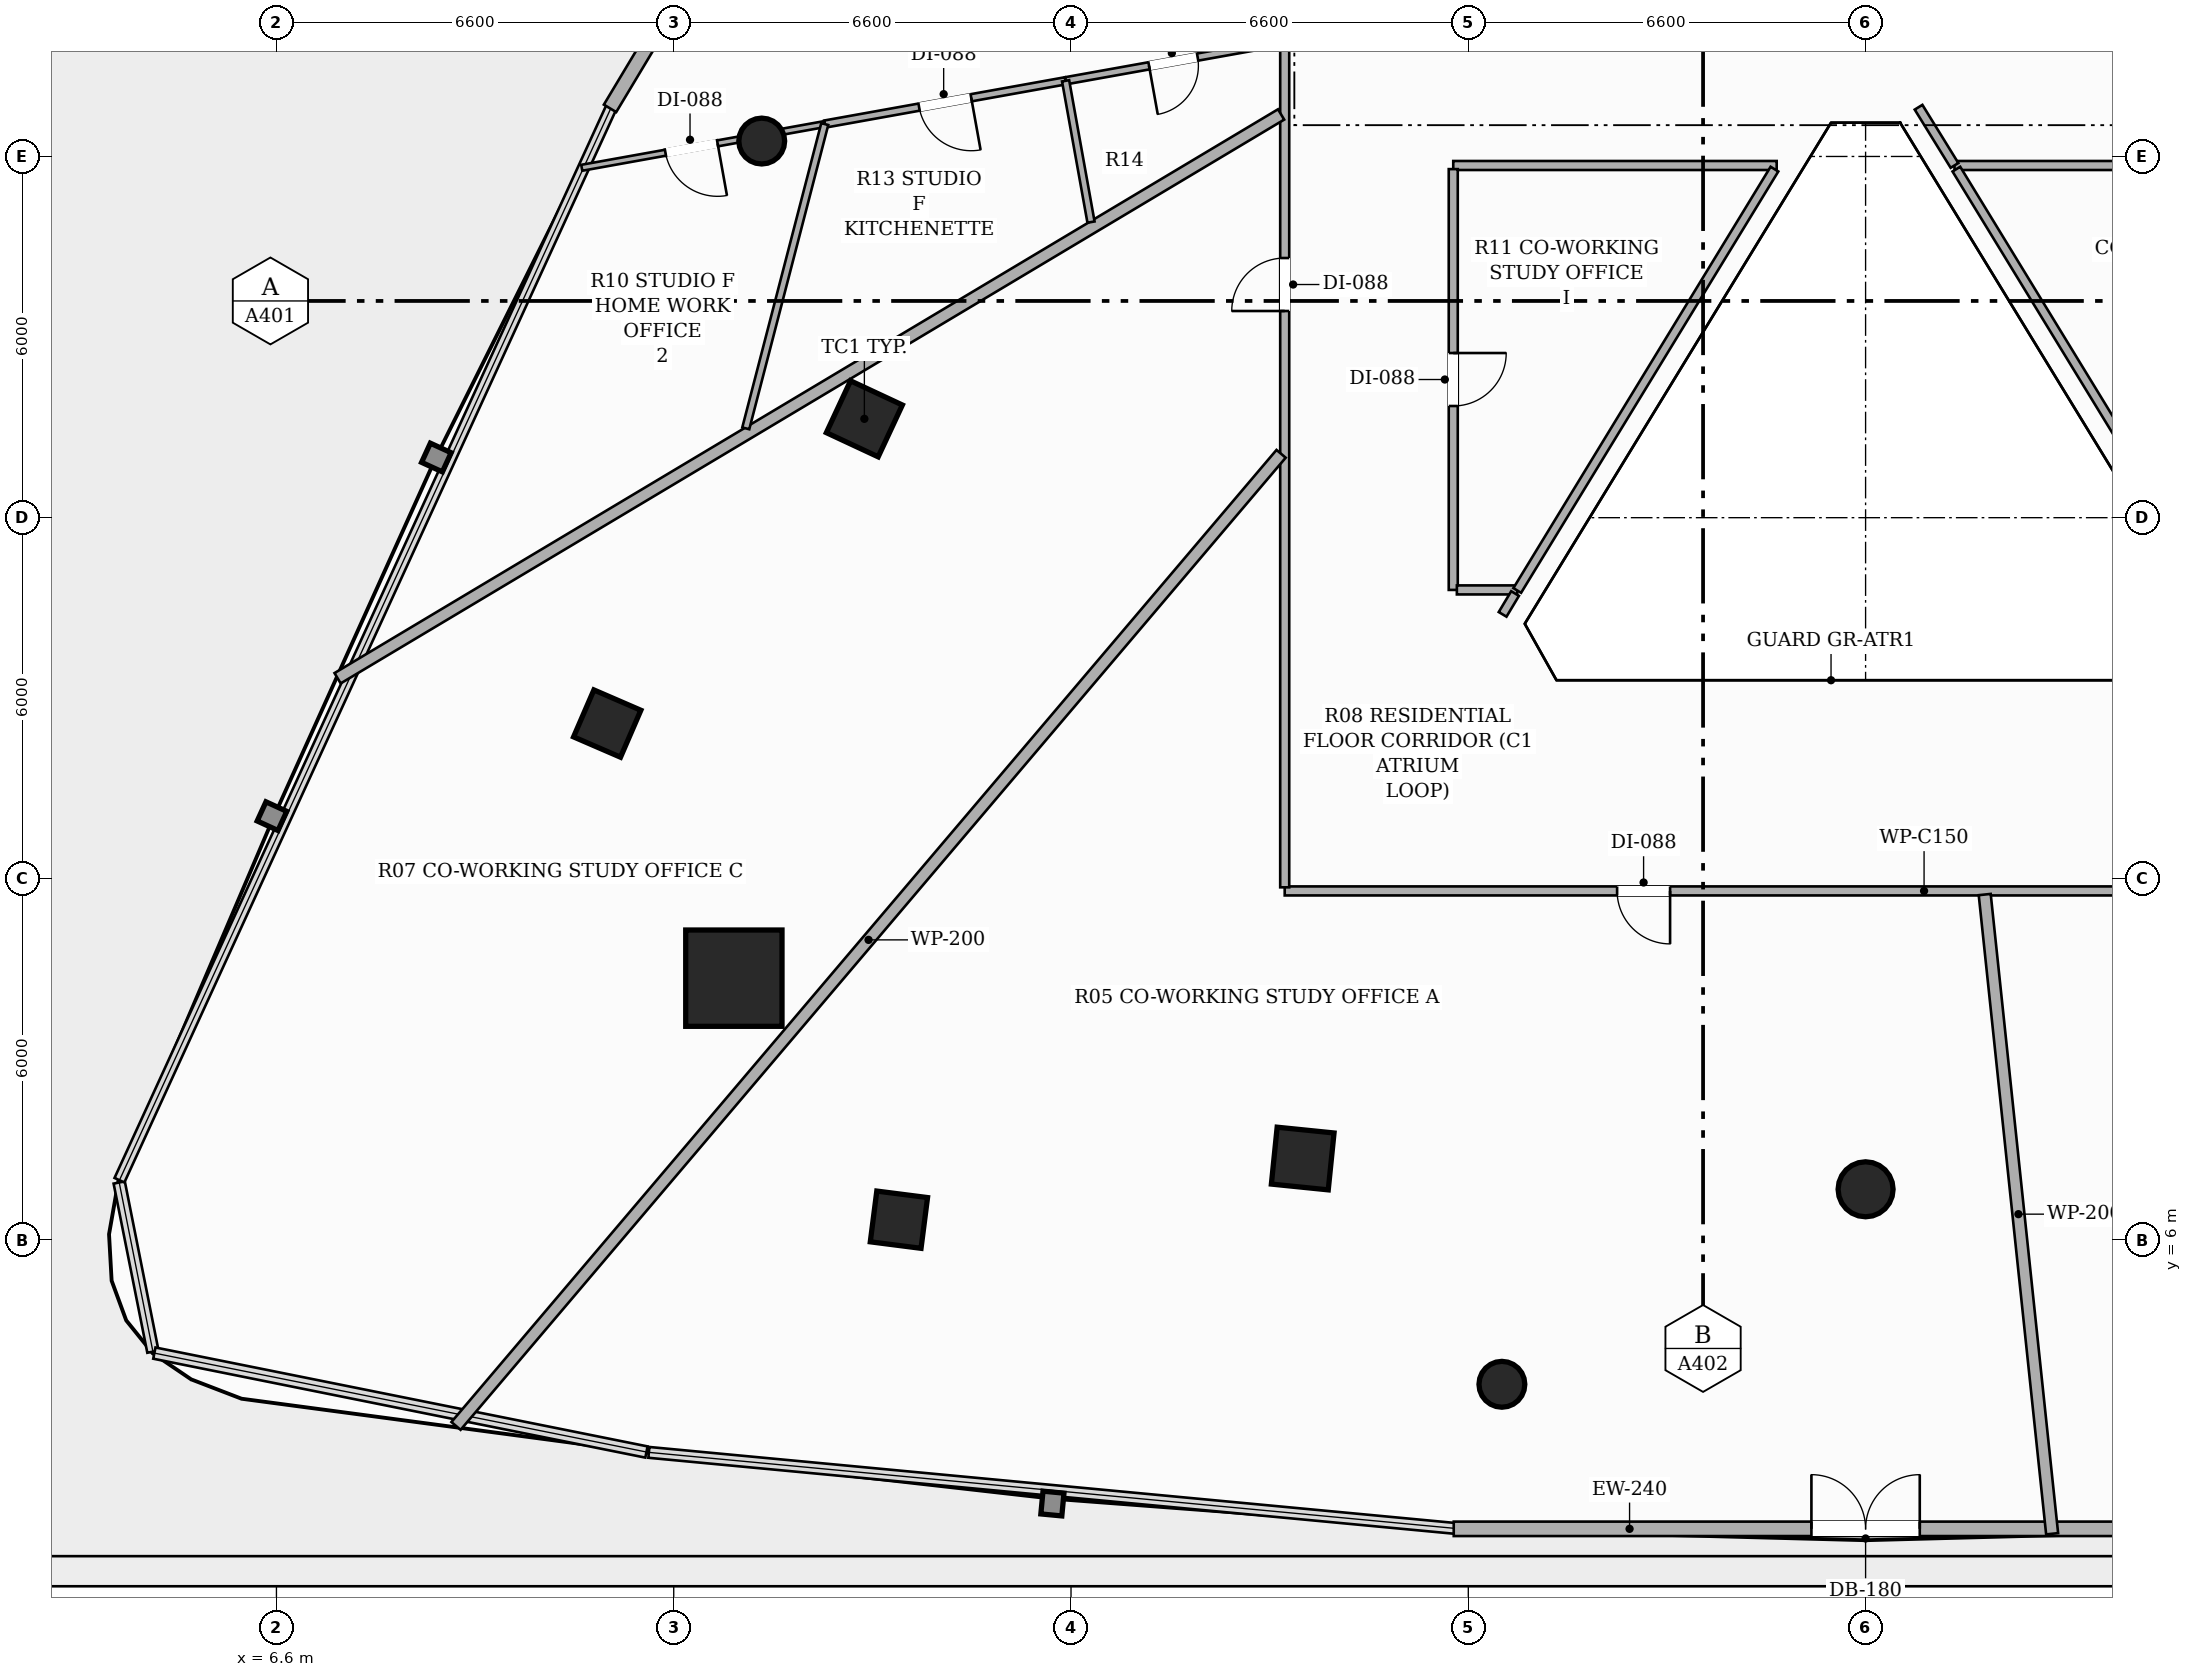
"""IFC4 building model, lengths in metres.
Left out: names, types, materials, properties, quantities, classifications, styles, units other than length and angle.
Written with IfcOpenShell. Run it as: python <this file> out.ifc"""

import sys

from ifc_helpers import new_model, si_unit, direction, frame, frame_2d, origin, origin_2d, place, context, subcontext, project, spatial, rectangle, hollow_rectangle, hollow_circle, extrude, element, fill, save


model = new_model("IFC4")
c1 = context("Model", 3, precision=1e-05, world=origin(), true_north=direction((0.0, 1.0)))
c2 = subcontext(c1, "Body", "Model", "MODEL_VIEW")
j1 = project(units=[si_unit("LENGTHUNIT", "METRE"), si_unit("PLANEANGLEUNIT", "RADIAN")], contexts=[c1])
p1 = place(None, origin())
s1 = spatial("IfcSite", under=j1, at=p1, CompositionType="ELEMENT")
p2 = place(p1, origin())
s2 = spatial("IfcBuilding", under=s1, at=p2, CompositionType="ELEMENT")
p3 = place(p2, frame((0.0, 0.0, 23.6)))
s3 = spatial("IfcBuildingStorey", under=s2, at=p3, CompositionType="ELEMENT", Elevation=23.6)
p4 = place(p3, frame((14.199, 10.351, 0.0), z_axis=(0.0, 0.0, 1.0), x_axis=(1.0, 0.0, 0.0)))
e1 = element("IfcColumn", 1, at=p4, inside=s3, PredefinedType="COLUMN", context=c2, shape_type="SweptSolid", body=[
    extrude(hollow_rectangle(XDim=1.6, YDim=1.6, WallThickness=0.05, at=origin_2d()), origin(), (0.0, 0.0, 1.0), 3.3),
])
for number, where, z_axis, x_axis in (
    (2, (16.367, 19.642, 0.0), (0.0, 0.0, 1.0), (0.423, 0.906, 0.0)),
    (3, (23.649, 7.355, 0.0), (0.0, 0.0, 1.0), (-0.995, 0.101, 0.0)),
):
    element("IfcColumn", number, at=place(p3, frame(where, z_axis=z_axis, x_axis=x_axis)), inside=s3, PredefinedType="COLUMN", context=c2, shape_type="SweptSolid", body=[
        extrude(hollow_rectangle(XDim=0.95, YDim=0.95, WallThickness=0.032, at=origin_2d()), origin(), (0.0, 0.0, 1.0), 3.3),
    ])
p5 = place(p3, frame((33.0, 6.844, 0.0), z_axis=(0.0, 0.0, 1.0), x_axis=(1.0, 0.0, 0.0)))
e4 = element("IfcColumn", 4, at=p5, inside=s3, PredefinedType="COLUMN", context=c2, shape_type="SweptSolid", body=[
    extrude(hollow_circle(Radius=0.457, WallThickness=0.025, at=origin_2d()), origin(), (0.0, 0.0, 1.0), 3.3),
])
for number, where, z_axis, x_axis in (
    (5, (12.095, 14.58, 0.0), (0.0, 0.0, 1.0), (0.397, 0.918, 0.0)),
    (6, (16.941, 6.339, 0.0), (0.0, 0.0, 1.0), (-0.992, 0.127, 0.0)),
):
    element("IfcColumn", number, at=place(p3, frame(where, z_axis=z_axis, x_axis=x_axis)), inside=s3, PredefinedType="COLUMN", context=c2, shape_type="SweptSolid", body=[
        extrude(hollow_rectangle(XDim=0.85, YDim=0.85, WallThickness=0.028, at=origin_2d()), origin(), (0.0, 0.0, 1.0), 3.3),
    ])
for number, where, z_axis, x_axis in (
    (7, (14.662, 24.256, 0.0), (0.0, 0.0, 1.0), (1.0, 0.0, 0.0)),
    (8, (26.958, 3.605, 0.0), (0.0, 0.0, 1.0), (1.0, 0.0, 0.0)),
):
    element("IfcColumn", number, at=place(p3, frame(where, z_axis=z_axis, x_axis=x_axis)), inside=s3, PredefinedType="COLUMN", context=c2, shape_type="SweptSolid", body=[
        extrude(hollow_circle(Radius=0.381, WallThickness=0.022, at=origin_2d()), origin(), (0.0, 0.0, 1.0), 3.3),
    ])
p6 = place(p3, frame((18.957, 36.16, 0.0), z_axis=(0.0, 0.0, 1.0), x_axis=(-0.514409031138, -0.857544954323, 0.0)))
e9 = element("IfcWall", 9, at=p6, inside=s3, PredefinedType="SOLIDWALL", context=c2, shape_type="SweptSolid", body=[
    extrude(rectangle(XDim=13.248, YDim=0.24, at=frame_2d((6.624, 0.0))), origin(), (0.0, 0.0, 1.0), 2.624),
])
p7 = place(p6, frame((5.724, 0.0, 0.0)))
e10 = element("IfcOpeningElement", 10, at=p7, cuts=e9, PredefinedType="OPENING", context=c2, shape_type="SweptSolid", body=[
    extrude(rectangle(XDim=1.8, YDim=2.2, at=frame_2d((0.9, 1.1))), frame((0.0, 0.13, 0.0), z_axis=(0.0, -1.0, 0.0), x_axis=(1.0, 0.0, 0.0)), (0.0, 0.0, 1.0), 0.26),
])
p8 = place(p3, frame((26.158, 1.204, 0.0), z_axis=(0.0, 0.0, 1.0), x_axis=(1.0, 0.0, 0.0)))
e11 = element("IfcWall", 11, at=p8, inside=s3, PredefinedType="SOLIDWALL", context=c2, shape_type="SweptSolid", body=[
    extrude(rectangle(XDim=13.684, YDim=0.24, at=frame_2d((6.842, 0.0))), origin(), (0.0, 0.0, 1.0), 2.624),
])
p9 = place(p8, frame((5.942, 0.0, 0.0)))
e12 = element("IfcOpeningElement", 12, at=p9, cuts=e11, PredefinedType="OPENING", context=c2, shape_type="SweptSolid", body=[
    extrude(rectangle(XDim=1.8, YDim=2.2, at=frame_2d((0.9, 1.1))), frame((0.0, 0.13, 0.0), z_axis=(0.0, -1.0, 0.0), x_axis=(1.0, 0.0, 0.0)), (0.0, 0.0, 1.0), 0.26),
])
p10 = place(p3, frame((42.59, 11.8, 0.0), z_axis=(0.0, 0.0, 1.0), x_axis=(-1.0, 0.0, 0.0)))
e13 = element("IfcWall", 13, at=p10, inside=s3, PredefinedType="PARTITIONING", context=c2, shape_type="SweptSolid", body=[
    extrude(rectangle(XDim=19.24, YDim=0.15, at=frame_2d((9.62, 0.0))), origin(), (0.0, 0.0, 1.0), 2.669),
])
p11 = place(p10, frame((12.838, 0.0, 0.0)))
e14 = element("IfcOpeningElement", 14, at=p11, cuts=e13, PredefinedType="OPENING", context=c2, shape_type="SweptSolid", body=[
    extrude(rectangle(XDim=0.88, YDim=2.1, at=frame_2d((0.44, 1.05))), frame((0.0, 0.085, 0.0), z_axis=(0.0, -1.0, 0.0), x_axis=(1.0, 0.0, 0.0)), (0.0, 0.0, 1.0), 0.17),
])
p12 = place(p10, frame((3.519, 0.0, 0.0)))
e15 = element("IfcOpeningElement", 15, at=p12, cuts=e13, PredefinedType="OPENING", context=c2, shape_type="SweptSolid", body=[
    extrude(rectangle(XDim=0.88, YDim=2.1, at=frame_2d((0.44, 1.05))), frame((0.0, 0.085, 0.0), z_axis=(0.0, -1.0, 0.0), x_axis=(1.0, 0.0, 0.0)), (0.0, 0.0, 1.0), 0.17),
])
p13 = place(p3, frame((23.35, 11.86, 0.0), z_axis=(0.0, 0.0, 1.0), x_axis=(0.0, 1.0, 0.0)))
e16 = element("IfcWall", 16, at=p13, inside=s3, PredefinedType="PARTITIONING", context=c2, shape_type="SweptSolid", body=[
    extrude(rectangle(XDim=25.04, YDim=0.15, at=frame_2d((12.52, 0.0))), origin(), (0.0, 0.0, 1.0), 2.413),
])
p14 = place(p13, frame((9.573, 0.0, 0.0)))
e17 = element("IfcOpeningElement", 17, at=p14, cuts=e16, PredefinedType="OPENING", context=c2, shape_type="SweptSolid", body=[
    extrude(rectangle(XDim=0.88, YDim=2.1, at=frame_2d((0.44, 1.05))), frame((0.0, 0.085, 0.0), z_axis=(0.0, -1.0, 0.0), x_axis=(1.0, 0.0, 0.0)), (0.0, 0.0, 1.0), 0.17),
])
p15 = place(p13, frame((18.329, 0.0, 0.0)))
e18 = element("IfcOpeningElement", 18, at=p15, cuts=e16, PredefinedType="OPENING", context=c2, shape_type="SweptSolid", body=[
    extrude(rectangle(XDim=0.92, YDim=2.15, at=frame_2d((0.46, 1.075))), frame((0.0, 0.085, 0.0), z_axis=(0.0, -1.0, 0.0), x_axis=(1.0, 0.0, 0.0)), (0.0, 0.0, 1.0), 0.17),
])
p16 = place(p3, frame((31.523, 23.85, 0.0), z_axis=(0.0, 0.0, 1.0), x_axis=(-1.0, 0.0, 0.0)))
e19 = element("IfcWall", 19, at=p16, inside=s3, PredefinedType="PARTITIONING", context=c2, shape_type="SweptSolid", body=[
    extrude(rectangle(XDim=5.373, YDim=0.15, at=frame_2d((2.687, 0.0))), origin(), (0.0, 0.0, 1.0), 2.669),
])
p17 = place(p3, frame((26.15, 23.79, 0.0), z_axis=(0.0, 0.0, 1.0), x_axis=(0.0, -1.0, 0.0)))
e20 = element("IfcWall", 20, at=p17, inside=s3, PredefinedType="PARTITIONING", context=c2, shape_type="SweptSolid", body=[
    extrude(rectangle(XDim=6.99, YDim=0.15, at=frame_2d((3.495, 0.0))), origin(), (0.0, 0.0, 1.0), 2.669),
])
p18 = place(p17, frame((3.055, 0.0, 0.0)))
e21 = element("IfcOpeningElement", 21, at=p18, cuts=e20, PredefinedType="OPENING", context=c2, shape_type="SweptSolid", body=[
    extrude(rectangle(XDim=0.88, YDim=2.1, at=frame_2d((0.44, 1.05))), frame((0.0, 0.085, 0.0), z_axis=(0.0, -1.0, 0.0), x_axis=(1.0, 0.0, 0.0)), (0.0, 0.0, 1.0), 0.17),
])
p19 = place(p3, frame((26.21, 16.8, 0.0), z_axis=(0.0, 0.0, 1.0), x_axis=(1.0, 0.0, 0.0)))
e22 = element("IfcWall", 22, at=p19, inside=s3, PredefinedType="PARTITIONING", context=c2, shape_type="SweptSolid", body=[
    extrude(rectangle(XDim=1.003, YDim=0.15, at=frame_2d((0.501, 0.0))), origin(), (0.0, 0.0, 1.0), 3.06),
])
p20 = place(p3, frame((27.177, 16.74, 0.0), z_axis=(0.0, 0.0, 1.0), x_axis=(-0.513515835534, -0.858080116688, 0.0)))
e23 = element("IfcWall", 23, at=p20, inside=s3, PredefinedType="PARTITIONING", context=c2, shape_type="SweptSolid", body=[
    extrude(rectangle(XDim=0.403, YDim=0.15, at=frame_2d((0.202, 0.0))), origin(), (0.0, 0.0, 1.0), 3.06),
])
p21 = place(p3, frame((39.79, 23.85, 0.0), z_axis=(0.0, 0.0, 1.0), x_axis=(-1.0, 0.0, 0.0)))
e24 = element("IfcWall", 24, at=p21, inside=s3, PredefinedType="PARTITIONING", context=c2, shape_type="SweptSolid", body=[
    extrude(rectangle(XDim=5.313, YDim=0.15, at=frame_2d((2.656, 0.0))), origin(), (0.0, 0.0, 1.0), 2.669),
])
p22 = place(p3, frame((34.477, 23.851, 0.0), z_axis=(0.0, 0.0, 1.0), x_axis=(-0.52541513414, 0.8508460124, 0.0)))
e25 = element("IfcWall", 25, at=p22, inside=s3, PredefinedType="PARTITIONING", context=c2, shape_type="SweptSolid", body=[
    extrude(rectangle(XDim=1.136, YDim=0.15, at=frame_2d((0.568, 0.0))), origin(), (0.0, 0.0, 1.0), 3.06),
])
p23 = place(p3, frame((27.213, 16.791, 0.0), z_axis=(0.0, 0.0, 1.0), x_axis=(0.521095914239, 0.853498124288, 0.0)))
e26 = element("IfcWall", 26, at=p23, inside=s3, PredefinedType="PARTITIONING", context=c2, shape_type="SweptSolid", body=[
    extrude(rectangle(XDim=8.2, YDim=0.15, at=frame_2d((4.1, 0.0))), origin(), (0.0, 0.0, 1.0), 2.669),
])
p24 = place(p3, frame((34.508, 23.79, 0.0), z_axis=(0.0, 0.0, 1.0), x_axis=(0.52163195406, -0.853170618636, 0.0)))
e27 = element("IfcWall", 27, at=p24, inside=s3, PredefinedType="PARTITIONING", context=c2, shape_type="SweptSolid", body=[
    extrude(rectangle(XDim=8.195, YDim=0.15, at=frame_2d((4.098, 0.0))), origin(), (0.0, 0.0, 1.0), 2.669),
])
p25 = place(p3, frame((9.583, 2.913, 0.0), z_axis=(0.0, 0.0, 1.0), x_axis=(0.647135024662, 0.76237540612, 0.0)))
e28 = element("IfcWall", 28, at=p25, inside=s3, PredefinedType="PARTITIONING", context=c2, shape_type="SweptSolid", body=[
    extrude(rectangle(XDim=21.181, YDim=0.2, at=frame_2d((10.591, 0.0))), origin(), (0.0, 0.0, 1.0), 2.413),
])
p26 = place(p3, frame((34.979, 11.74, 0.0), z_axis=(0.0, 0.0, 1.0), x_axis=(0.104910939681, -0.994481621115, 0.0)))
e29 = element("IfcWall", 29, at=p26, inside=s3, PredefinedType="PARTITIONING", context=c2, shape_type="SweptSolid", body=[
    extrude(rectangle(XDim=10.677, YDim=0.2, at=frame_2d((5.338, 0.0))), origin(), (0.0, 0.0, 1.0), 2.413),
])
p27 = place(p3, frame((7.616, 15.333, 0.0), z_axis=(0.0, 0.0, 1.0), x_axis=(0.85844474206, 0.512906058483, 0.0)))
e30 = element("IfcWall", 30, at=p27, inside=s3, PredefinedType="PARTITIONING", context=c2, shape_type="SweptSolid", body=[
    extrude(rectangle(XDim=18.259, YDim=0.2, at=frame_2d((9.129, 0.0))), origin(), (0.0, 0.0, 1.0), 2.413),
])
p28 = place(p3, frame((23.29, 25.9, 0.0), z_axis=(0.0, 0.0, 1.0), x_axis=(-0.984259533521, -0.176729088363, 0.0)))
e31 = element("IfcWall", 31, at=p28, inside=s3, PredefinedType="PARTITIONING", context=c2, shape_type="SweptSolid", body=[
    extrude(rectangle(XDim=3.637, YDim=0.12, at=frame_2d((1.819, 0.0))), origin(), (0.0, 0.0, 1.0), 2.669),
])
p29 = place(p28, frame((1.409, 0.0, 0.0)))
e32 = element("IfcOpeningElement", 32, at=p29, cuts=e31, PredefinedType="OPENING", context=c2, shape_type="SweptSolid", body=[
    extrude(rectangle(XDim=0.82, YDim=2.1, at=frame_2d((0.41, 1.05))), frame((0.0, 0.07, 0.0), z_axis=(0.0, -1.0, 0.0), x_axis=(1.0, 0.0, 0.0)), (0.0, 0.0, 1.0), 0.14),
])
p30 = place(p3, frame((19.71, 25.257, 0.0), z_axis=(0.0, 0.0, 1.0), x_axis=(-0.984233964359, -0.176871431843, 0.0)))
e33 = element("IfcWall", 33, at=p30, inside=s3, PredefinedType="PARTITIONING", context=c2, shape_type="SweptSolid", body=[
    extrude(rectangle(XDim=4.065, YDim=0.12, at=frame_2d((2.033, 0.0))), origin(), (0.0, 0.0, 1.0), 2.413),
])
p31 = place(p30, frame((1.593, 0.0, 0.0)))
e34 = element("IfcOpeningElement", 34, at=p31, cuts=e33, PredefinedType="OPENING", context=c2, shape_type="SweptSolid", body=[
    extrude(rectangle(XDim=0.88, YDim=2.1, at=frame_2d((0.44, 1.05))), frame((0.0, 0.07, 0.0), z_axis=(0.0, -1.0, 0.0), x_axis=(1.0, 0.0, 0.0)), (0.0, 0.0, 1.0), 0.14),
])
p32 = place(p3, frame((15.709, 24.538, 0.0), z_axis=(0.0, 0.0, 1.0), x_axis=(-0.984207184065, -0.177020391014, 0.0)))
e35 = element("IfcWall", 35, at=p32, inside=s3, PredefinedType="PARTITIONING", context=c2, shape_type="SweptSolid", body=[
    extrude(rectangle(XDim=4.102, YDim=0.1, at=frame_2d((2.051, 0.0))), origin(), (0.0, 0.0, 1.0), 2.413),
])
p33 = place(p32, frame((1.809, 0.0, 0.0)))
e36 = element("IfcOpeningElement", 36, at=p33, cuts=e35, PredefinedType="OPENING", context=c2, shape_type="SweptSolid", body=[
    extrude(rectangle(XDim=0.88, YDim=2.1, at=frame_2d((0.44, 1.05))), frame((0.0, 0.06, 0.0), z_axis=(0.0, -1.0, 0.0), x_axis=(1.0, 0.0, 0.0)), (0.0, 0.0, 1.0), 0.12),
])
p34 = place(p3, frame((20.132, 22.91, 0.0), z_axis=(0.0, 0.0, 1.0), x_axis=(-0.177002273268, 0.984210442567, 0.0)))
e37 = element("IfcWall", 37, at=p34, inside=s3, PredefinedType="PARTITIONING", context=c2, shape_type="SweptSolid", body=[
    extrude(rectangle(XDim=2.385, YDim=0.12, at=frame_2d((1.192, 0.0))), origin(), (0.0, 0.0, 1.0), 2.669),
])
p35 = place(p3, frame((14.397, 19.484, 0.0), z_axis=(0.0, 0.0, 1.0), x_axis=(0.251260704977, 0.967919448164, 0.0)))
e38 = element("IfcWall", 38, at=p35, inside=s3, PredefinedType="PARTITIONING", context=c2, shape_type="SweptSolid", body=[
    extrude(rectangle(XDim=5.222, YDim=0.12, at=frame_2d((2.611, 0.0))), origin(), (0.0, 0.0, 1.0), 2.413),
])
p36 = place(p9, origin())
e39 = element("IfcDoor", 39, at=p36, inside=s3, OperationType="DOUBLE_DOOR_SINGLE_SWING", PredefinedType="DOOR", context=c2, shape_type="SweptSolid", body=[
    extrude(rectangle(XDim=1.8, YDim=2.2, at=frame_2d((0.9, 1.1))), frame((0.0, 0.025, 0.0), z_axis=(0.0, -1.0, 0.0), x_axis=(1.0, 0.0, 0.0)), (0.0, 0.0, 1.0), 0.05),
])
fill(e12, e39)
p37 = place(p11, origin())
e40 = element("IfcDoor", 40, at=p37, inside=s3, OperationType="SINGLE_SWING_LEFT", PredefinedType="DOOR", context=c2, shape_type="SweptSolid", body=[
    extrude(rectangle(XDim=0.88, YDim=2.1, at=frame_2d((0.44, 1.05))), frame((0.0, 0.025, 0.0), z_axis=(0.0, -1.0, 0.0), x_axis=(1.0, 0.0, 0.0)), (0.0, 0.0, 1.0), 0.05),
])
fill(e14, e40)
p38 = place(p14, origin())
e41 = element("IfcDoor", 41, at=p38, inside=s3, OperationType="SINGLE_SWING_LEFT", PredefinedType="DOOR", context=c2, shape_type="SweptSolid", body=[
    extrude(rectangle(XDim=0.88, YDim=2.1, at=frame_2d((0.44, 1.05))), frame((0.0, 0.025, 0.0), z_axis=(0.0, -1.0, 0.0), x_axis=(1.0, 0.0, 0.0)), (0.0, 0.0, 1.0), 0.05),
])
fill(e17, e41)
p39 = place(p29, origin())
e42 = element("IfcDoor", 42, at=p39, inside=s3, OperationType="SINGLE_SWING_RIGHT", PredefinedType="DOOR", context=c2, shape_type="SweptSolid", body=[
    extrude(rectangle(XDim=0.82, YDim=2.1, at=frame_2d((0.41, 1.05))), frame((0.0, 0.025, 0.0), z_axis=(0.0, -1.0, 0.0), x_axis=(1.0, 0.0, 0.0)), (0.0, 0.0, 1.0), 0.05),
])
fill(e32, e42)
p40 = place(p31, origin())
e43 = element("IfcDoor", 43, at=p40, inside=s3, OperationType="SINGLE_SWING_LEFT", PredefinedType="DOOR", context=c2, shape_type="SweptSolid", body=[
    extrude(rectangle(XDim=0.88, YDim=2.1, at=frame_2d((0.44, 1.05))), frame((0.0, 0.025, 0.0), z_axis=(0.0, -1.0, 0.0), x_axis=(1.0, 0.0, 0.0)), (0.0, 0.0, 1.0), 0.05),
])
fill(e34, e43)
p41 = place(p33, origin())
e44 = element("IfcDoor", 44, at=p41, inside=s3, OperationType="SINGLE_SWING_LEFT", PredefinedType="DOOR", context=c2, shape_type="SweptSolid", body=[
    extrude(rectangle(XDim=0.88, YDim=2.1, at=frame_2d((0.44, 1.05))), frame((0.0, 0.025, 0.0), z_axis=(0.0, -1.0, 0.0), x_axis=(1.0, 0.0, 0.0)), (0.0, 0.0, 1.0), 0.05),
])
fill(e36, e44)
p42 = place(p18, origin())
e45 = element("IfcDoor", 45, at=p42, inside=s3, OperationType="SINGLE_SWING_LEFT", PredefinedType="DOOR", context=c2, shape_type="SweptSolid", body=[
    extrude(rectangle(XDim=0.88, YDim=2.1, at=frame_2d((0.44, 1.05))), frame((0.0, 0.025, 0.0), z_axis=(0.0, -1.0, 0.0), x_axis=(1.0, 0.0, 0.0)), (0.0, 0.0, 1.0), 0.05),
])
fill(e21, e45)
save(model, sys.argv[1])
